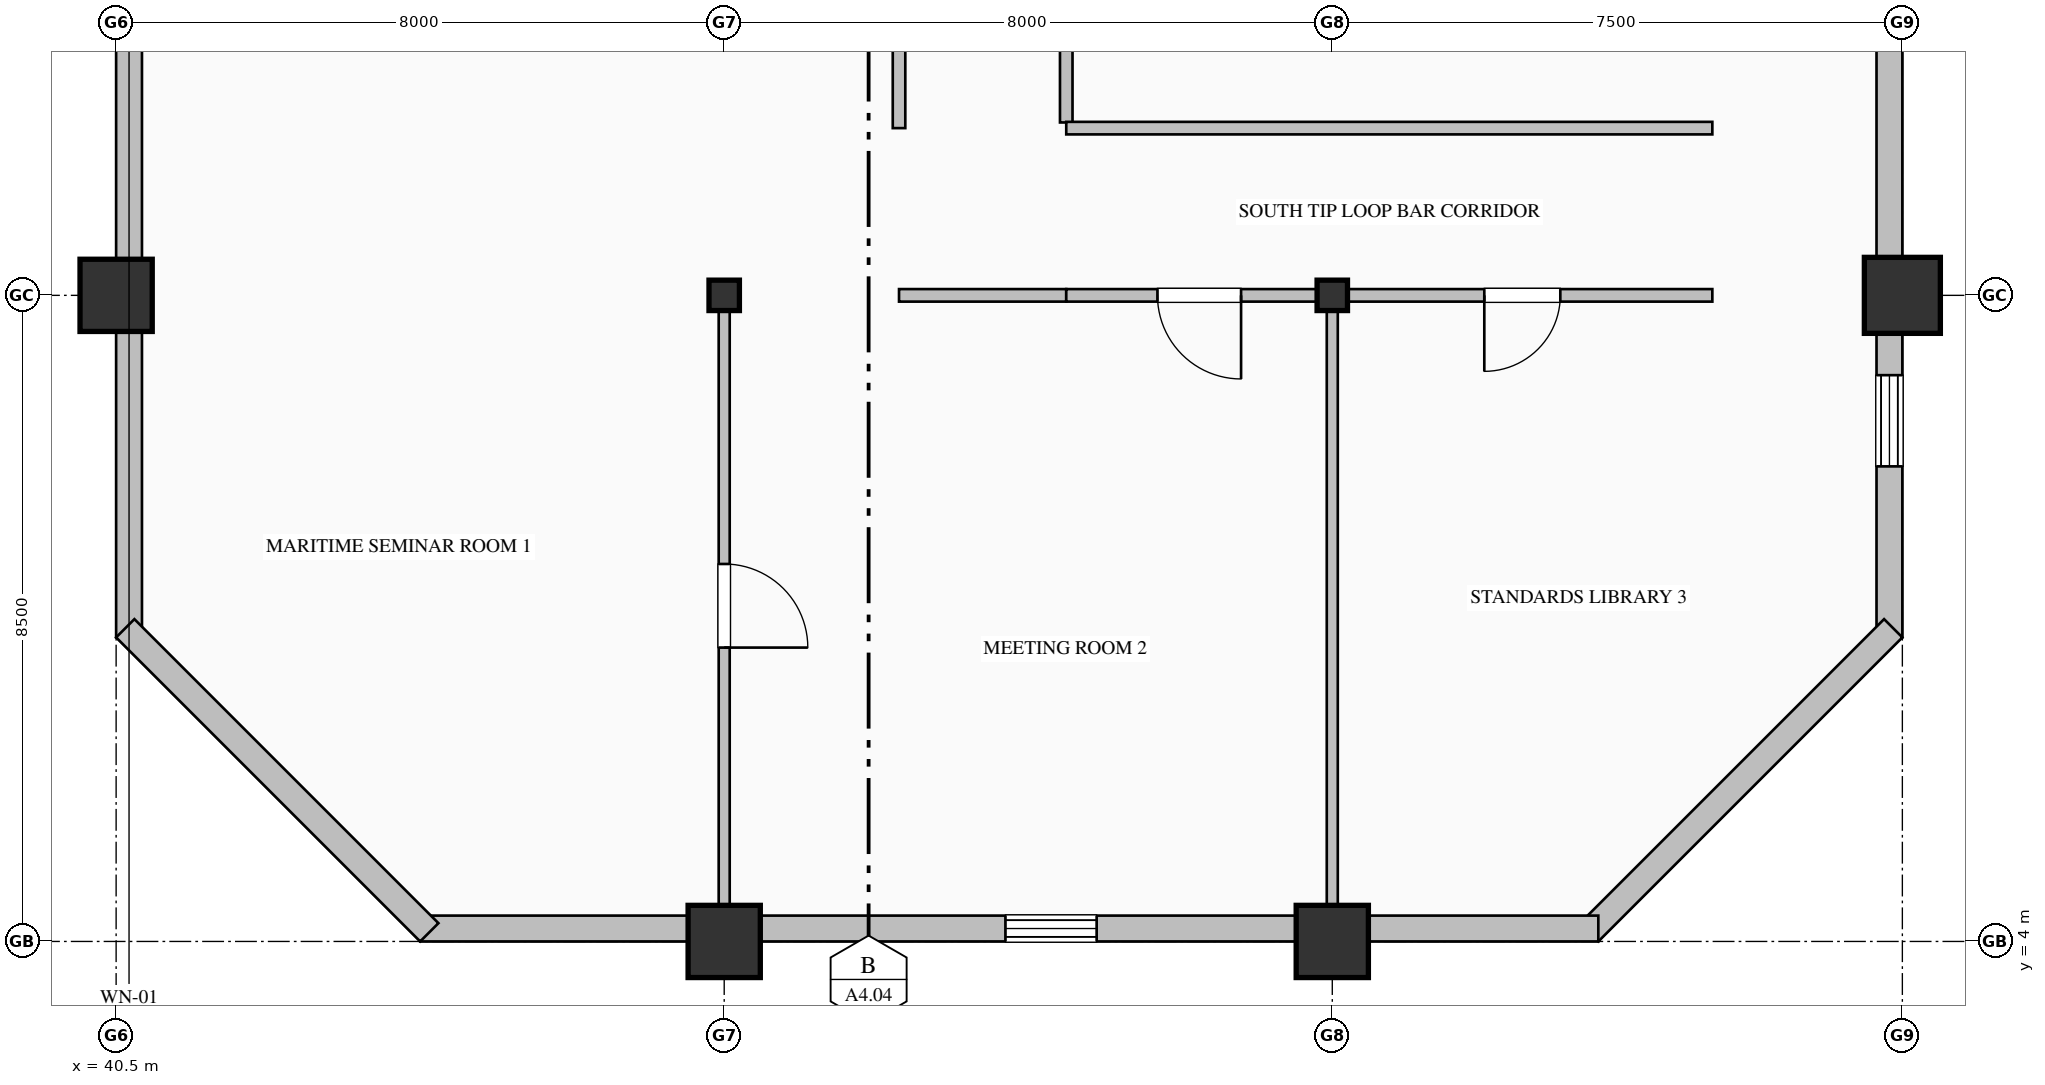
"""IFC4 building model, lengths in metres.
Left out: names, types, materials, properties, quantities, classifications, styles, units other than length and angle.
Written with IfcOpenShell. Run it as: python <this file> out.ifc"""

import sys

from ifc_helpers import new_model, si_unit, direction, frame, frame_2d, origin, origin_2d, place, context, subcontext, project, spatial, rectangle, hollow_rectangle, hollow_circle, i_section, extrude, element, fill, save


model = new_model("IFC4")
c1 = context("Model", 3, precision=1e-05, world=origin(), true_north=direction((0.0, 1.0)))
c2 = subcontext(c1, "Body", "Model", "MODEL_VIEW")
j1 = project(units=[si_unit("LENGTHUNIT", "METRE"), si_unit("PLANEANGLEUNIT", "RADIAN")], contexts=[c1])
p1 = place(None, origin())
s1 = spatial("IfcSite", under=j1, at=p1, CompositionType="ELEMENT")
p2 = place(p1, origin())
s2 = spatial("IfcBuilding", under=s1, at=p2, CompositionType="ELEMENT")
p3 = place(p2, frame((0.0, 0.0, 135.0)))
s3 = spatial("IfcBuildingStorey", under=s2, at=p3, CompositionType="ELEMENT", Elevation=135.0)
for number, where, z_axis, x_axis in (
    (1, (40.5, 12.5, 0.0), (0.0, 0.0, 1.0), (1.0, 0.0, 0.0)),
    (2, (48.5, 4.0, 0.0), (0.0, 0.0, 1.0), (1.0, 0.0, 0.0)),
):
    element("IfcColumn", number, at=place(p3, frame(where, z_axis=z_axis, x_axis=x_axis)), inside=s3, PredefinedType="COLUMN", context=c2, shape_type="SweptSolid", body=[
        extrude(hollow_rectangle(XDim=0.95, YDim=0.95, WallThickness=0.036, at=origin_2d()), origin(), (0.0, 0.0, 1.0), 4.0),
    ])
p4 = place(p3, frame((48.5, 12.5, 0.0), z_axis=(0.0, 0.0, 1.0), x_axis=(1.0, 0.0, 0.0)))
e3 = element("IfcColumn", 3, at=p4, inside=s3, PredefinedType="COLUMN", context=c2, shape_type="SweptSolid", body=[
    extrude(i_section(OverallWidth=0.4, OverallDepth=0.4, WebThickness=0.013, FlangeThickness=0.021, FilletRadius=0.022, at=origin_2d()), origin(), (0.0, 0.0, 1.0), 4.0),
])
p5 = place(p3, frame((56.5, 4.0, 0.0), z_axis=(0.0, 0.0, 1.0), x_axis=(1.0, 0.0, 0.0)))
e4 = element("IfcColumn", 4, at=p5, inside=s3, PredefinedType="COLUMN", context=c2, shape_type="SweptSolid", body=[
    extrude(hollow_rectangle(XDim=0.95, YDim=0.95, WallThickness=0.036, at=origin_2d()), origin(), (0.0, 0.0, 1.0), 4.0),
])
p6 = place(p3, frame((56.5, 12.5, 0.0), z_axis=(0.0, 0.0, 1.0), x_axis=(1.0, 0.0, 0.0)))
e5 = element("IfcColumn", 5, at=p6, inside=s3, PredefinedType="COLUMN", context=c2, shape_type="SweptSolid", body=[
    extrude(i_section(OverallWidth=0.4, OverallDepth=0.4, WebThickness=0.013, FlangeThickness=0.021, FilletRadius=0.022, at=origin_2d()), origin(), (0.0, 0.0, 1.0), 4.0),
])
p7 = place(p3, frame((64.0, 12.5, 0.0), z_axis=(0.0, 0.0, 1.0), x_axis=(1.0, 0.0, 0.0)))
e6 = element("IfcColumn", 6, at=p7, inside=s3, PredefinedType="COLUMN", context=c2, shape_type="SweptSolid", body=[
    extrude(hollow_circle(Radius=0.5, WallThickness=0.036, at=origin_2d()), origin(), (0.0, 0.0, 1.0), 4.0),
])
p8 = place(p3, frame((40.67, 8.0, 0.0), z_axis=(0.0, 0.0, 1.0), x_axis=(0.0, 1.0, 0.0)))
e7 = element("IfcWall", 7, at=p8, inside=s3, PredefinedType="SOLIDWALL", context=c2, shape_type="SweptSolid", body=[
    extrude(rectangle(XDim=20.34, YDim=0.34, at=frame_2d((10.17, 0.0))), origin(), (0.0, 0.0, 1.0), 3.165),
])
p9 = place(p8, frame((13.8, 0.0, 0.7)))
e8 = element("IfcOpeningElement", 8, at=p9, cuts=e7, PredefinedType="OPENING", context=c2, shape_type="SweptSolid", body=[
    extrude(rectangle(XDim=1.2, YDim=1.85, at=frame_2d((0.6, 0.925))), frame((0.0, 0.18, 0.0), z_axis=(0.0, -1.0, 0.0), x_axis=(1.0, 0.0, 0.0)), (0.0, 0.0, 1.0), 0.36),
])
p10 = place(p3, frame((63.83, 36.05, 0.0), z_axis=(0.0, 0.0, 1.0), x_axis=(0.0, -1.0, 0.0)))
e9 = element("IfcWall", 9, at=p10, inside=s3, PredefinedType="SOLIDWALL", context=c2, shape_type="SweptSolid", body=[
    extrude(rectangle(XDim=28.05, YDim=0.34, at=frame_2d((14.025, 0.0))), origin(), (0.0, 0.0, 1.0), 3.265),
])
p11 = place(p10, frame((3.0, 0.0, 0.7)))
e10 = element("IfcOpeningElement", 10, at=p11, cuts=e9, PredefinedType="OPENING", context=c2, shape_type="SweptSolid", body=[
    extrude(rectangle(XDim=1.2, YDim=1.85, at=frame_2d((0.6, 0.925))), frame((0.0, 0.18, 0.0), z_axis=(0.0, -1.0, 0.0), x_axis=(1.0, 0.0, 0.0)), (0.0, 0.0, 1.0), 0.36),
])
p12 = place(p10, frame((9.975, 0.0, 0.85)))
e11 = element("IfcOpeningElement", 11, at=p12, cuts=e9, PredefinedType="OPENING", context=c2, shape_type="SweptSolid", body=[
    extrude(rectangle(XDim=1.65, YDim=1.95, at=frame_2d((0.825, 0.975))), frame((0.0, 0.18, 0.0), z_axis=(0.0, -1.0, 0.0), x_axis=(1.0, 0.0, 0.0)), (0.0, 0.0, 1.0), 0.36),
])
p13 = place(p10, frame((13.8, 0.0, 0.7)))
e12 = element("IfcOpeningElement", 12, at=p13, cuts=e9, PredefinedType="OPENING", context=c2, shape_type="SweptSolid", body=[
    extrude(rectangle(XDim=1.2, YDim=1.85, at=frame_2d((0.6, 0.925))), frame((0.0, 0.18, 0.0), z_axis=(0.0, -1.0, 0.0), x_axis=(1.0, 0.0, 0.0)), (0.0, 0.0, 1.0), 0.36),
])
p14 = place(p10, frame((24.6, 0.0, 0.7)))
e13 = element("IfcOpeningElement", 13, at=p14, cuts=e9, PredefinedType="OPENING", context=c2, shape_type="SweptSolid", body=[
    extrude(rectangle(XDim=1.2, YDim=1.85, at=frame_2d((0.6, 0.925))), frame((0.0, 0.18, 0.0), z_axis=(0.0, -1.0, 0.0), x_axis=(1.0, 0.0, 0.0)), (0.0, 0.0, 1.0), 0.36),
])
p15 = place(p3, frame((63.88, 8.12, 0.0), z_axis=(0.0, 0.0, 1.0), x_axis=(-0.707106781187, -0.707106781187, 0.0)))
e14 = element("IfcWall", 14, at=p15, inside=s3, PredefinedType="SOLIDWALL", context=c2, shape_type="SweptSolid", body=[
    extrude(rectangle(XDim=5.657, YDim=0.34, at=frame_2d((2.828, 0.0))), origin(), (0.0, 0.0, 1.0), 3.765),
])
p16 = place(p3, frame((60.0, 4.17, 0.0), z_axis=(0.0, 0.0, 1.0), x_axis=(-1.0, 0.0, 0.0)))
e15 = element("IfcWall", 15, at=p16, inside=s3, PredefinedType="SOLIDWALL", context=c2, shape_type="SweptSolid", body=[
    extrude(rectangle(XDim=15.5, YDim=0.34, at=frame_2d((7.75, 0.0))), origin(), (0.0, 0.0, 1.0), 3.265),
])
p17 = place(p16, frame((6.6, 0.0, 0.7)))
e16 = element("IfcOpeningElement", 16, at=p17, cuts=e15, PredefinedType="OPENING", context=c2, shape_type="SweptSolid", body=[
    extrude(rectangle(XDim=1.2, YDim=1.85, at=frame_2d((0.6, 0.925))), frame((0.0, 0.18, 0.0), z_axis=(0.0, -1.0, 0.0), x_axis=(1.0, 0.0, 0.0)), (0.0, 0.0, 1.0), 0.36),
])
p18 = place(p3, frame((44.62, 4.12, 0.0), z_axis=(0.0, 0.0, 1.0), x_axis=(-0.707106781187, 0.707106781187, 0.0)))
e17 = element("IfcWall", 17, at=p18, inside=s3, PredefinedType="SOLIDWALL", context=c2, shape_type="SweptSolid", body=[
    extrude(rectangle(XDim=5.657, YDim=0.34, at=frame_2d((2.828, 0.0))), origin(), (0.0, 0.0, 1.0), 3.765),
])
p19 = place(p3, frame((53.0, 33.525, 0.0), z_axis=(0.0, 0.0, 1.0), x_axis=(0.0, -1.0, 0.0)))
e18 = element("IfcWall", 18, at=p19, inside=s3, PredefinedType="PARTITIONING", context=c2, shape_type="SweptSolid", body=[
    extrude(rectangle(XDim=18.751, YDim=0.165, at=frame_2d((9.375, 0.0))), origin(), (0.0, 0.0, 1.0), 3.765),
])
p20 = place(p19, frame((8.875, 0.0, 0.0)))
e19 = element("IfcOpeningElement", 19, at=p20, cuts=e18, PredefinedType="OPENING", context=c2, shape_type="SweptSolid", body=[
    extrude(rectangle(XDim=1.0, YDim=2.15, at=frame_2d((0.5, 1.075))), frame((0.0, 0.093, 0.0), z_axis=(0.0, -1.0, 0.0), x_axis=(1.0, 0.0, 0.0)), (0.0, 0.0, 1.0), 0.185),
])
p21 = place(p3, frame((50.8, 14.7, 0.0), z_axis=(0.0, 0.0, 1.0), x_axis=(0.0, 1.0, 0.0)))
e20 = element("IfcWall", 20, at=p21, inside=s3, PredefinedType="PARTITIONING", context=c2, shape_type="SweptSolid", body=[
    extrude(rectangle(XDim=18.825, YDim=0.165, at=frame_2d((9.413, 0.0))), origin(), (0.0, 0.0, 1.0), 3.765),
])
p22 = place(p21, frame((8.913, 0.0, 0.0)))
e21 = element("IfcOpeningElement", 21, at=p22, cuts=e20, PredefinedType="OPENING", context=c2, shape_type="SweptSolid", body=[
    extrude(rectangle(XDim=1.0, YDim=2.15, at=frame_2d((0.5, 1.075))), frame((0.0, 0.093, 0.0), z_axis=(0.0, -1.0, 0.0), x_axis=(1.0, 0.0, 0.0)), (0.0, 0.0, 1.0), 0.185),
])
p23 = place(p3, frame((53.0, 12.5, 0.0), z_axis=(0.0, 0.0, 1.0), x_axis=(-1.0, 0.0, 0.0)))
e22 = element("IfcWall", 22, at=p23, inside=s3, PredefinedType="PARTITIONING", context=c2, shape_type="SweptSolid", body=[
    extrude(rectangle(XDim=2.2, YDim=0.165, at=frame_2d((1.1, 0.0))), origin(), (0.0, 0.0, 1.0), 3.157),
])
p24 = place(p3, frame((53.0, 14.7, 0.0), z_axis=(0.0, 0.0, 1.0), x_axis=(1.0, 0.0, 0.0)))
e23 = element("IfcWall", 23, at=p24, inside=s3, PredefinedType="PARTITIONING", context=c2, shape_type="SweptSolid", body=[
    extrude(rectangle(XDim=8.5, YDim=0.165, at=frame_2d((4.25, 0.0))), origin(), (0.0, 0.0, 1.0), 3.765),
])
p25 = place(p3, frame((56.5, 12.5, 0.0), z_axis=(0.0, 0.0, 1.0), x_axis=(-1.0, 0.0, 0.0)))
e24 = element("IfcWall", 24, at=p25, inside=s3, PredefinedType="PARTITIONING", context=c2, shape_type="SweptSolid", body=[
    extrude(rectangle(XDim=3.5, YDim=0.165, at=frame_2d((1.75, 0.0))), origin(), (0.0, 0.0, 1.0), 3.157),
])
p26 = place(p25, frame((1.2, 0.0, 0.0)))
e25 = element("IfcOpeningElement", 25, at=p26, cuts=e24, PredefinedType="OPENING", context=c2, shape_type="SweptSolid", body=[
    extrude(rectangle(XDim=1.1, YDim=2.2, at=frame_2d((0.55, 1.1))), frame((0.0, 0.093, 0.0), z_axis=(0.0, -1.0, 0.0), x_axis=(1.0, 0.0, 0.0)), (0.0, 0.0, 1.0), 0.185),
])
p27 = place(p3, frame((61.5, 12.5, 0.0), z_axis=(0.0, 0.0, 1.0), x_axis=(-1.0, 0.0, 0.0)))
e26 = element("IfcWall", 26, at=p27, inside=s3, PredefinedType="PARTITIONING", context=c2, shape_type="SweptSolid", body=[
    extrude(rectangle(XDim=5.0, YDim=0.165, at=frame_2d((2.5, 0.0))), origin(), (0.0, 0.0, 1.0), 3.157),
])
p28 = place(p27, frame((2.0, 0.0, 0.0)))
e27 = element("IfcOpeningElement", 27, at=p28, cuts=e26, PredefinedType="OPENING", context=c2, shape_type="SweptSolid", body=[
    extrude(rectangle(XDim=1.0, YDim=2.15, at=frame_2d((0.5, 1.075))), frame((0.0, 0.093, 0.0), z_axis=(0.0, -1.0, 0.0), x_axis=(1.0, 0.0, 0.0)), (0.0, 0.0, 1.0), 0.185),
])
p29 = place(p3, frame((48.5, 12.5, 0.0), z_axis=(0.0, 0.0, 1.0), x_axis=(0.0, -1.0, 0.0)))
e28 = element("IfcWall", 28, at=p29, inside=s3, PredefinedType="PARTITIONING", context=c2, shape_type="SweptSolid", body=[
    extrude(rectangle(XDim=8.168, YDim=0.145, at=frame_2d((4.084, 0.0))), origin(), (0.0, 0.0, 1.0), 3.157),
])
p30 = place(p29, frame((3.534, 0.0, 0.0)))
e29 = element("IfcOpeningElement", 29, at=p30, cuts=e28, PredefinedType="OPENING", context=c2, shape_type="SweptSolid", body=[
    extrude(rectangle(XDim=1.1, YDim=2.2, at=frame_2d((0.55, 1.1))), frame((0.0, 0.083, 0.0), z_axis=(0.0, -1.0, 0.0), x_axis=(1.0, 0.0, 0.0)), (0.0, 0.0, 1.0), 0.165),
])
p31 = place(p3, frame((56.5, 12.426, 0.0), z_axis=(0.0, 0.0, 1.0), x_axis=(0.0, -1.0, 0.0)))
e30 = element("IfcWall", 30, at=p31, inside=s3, PredefinedType="PARTITIONING", context=c2, shape_type="SweptSolid", body=[
    extrude(rectangle(XDim=8.094, YDim=0.145, at=frame_2d((4.047, 0.0))), origin(), (0.0, 0.0, 1.0), 3.157),
])
p32 = place(p14, origin())
e31 = element("IfcWindow", 31, at=p32, inside=s3, PartitioningType="DOUBLE_PANEL_VERTICAL", PredefinedType="WINDOW", context=c2, shape_type="SweptSolid", body=[
    extrude(rectangle(XDim=1.2, YDim=1.85, at=frame_2d((0.6, 0.925))), frame((0.0, 0.15, 0.0), z_axis=(0.0, -1.0, 0.0), x_axis=(1.0, 0.0, 0.0)), (0.0, 0.0, 1.0), 0.06),
])
fill(e13, e31)
p33 = place(p17, origin())
e32 = element("IfcWindow", 32, at=p33, inside=s3, PartitioningType="DOUBLE_PANEL_VERTICAL", PredefinedType="WINDOW", context=c2, shape_type="SweptSolid", body=[
    extrude(rectangle(XDim=1.2, YDim=1.85, at=frame_2d((0.6, 0.925))), frame((0.0, 0.15, 0.0), z_axis=(0.0, -1.0, 0.0), x_axis=(1.0, 0.0, 0.0)), (0.0, 0.0, 1.0), 0.06),
])
fill(e16, e32)
p34 = place(p30, origin())
e33 = element("IfcDoor", 33, at=p34, inside=s3, OperationType="SINGLE_SWING_RIGHT", PredefinedType="DOOR", context=c2, shape_type="SweptSolid", body=[
    extrude(rectangle(XDim=1.1, YDim=2.2, at=frame_2d((0.55, 1.1))), frame((0.0, 0.025, 0.0), z_axis=(0.0, -1.0, 0.0), x_axis=(1.0, 0.0, 0.0)), (0.0, 0.0, 1.0), 0.05),
])
fill(e29, e33)
p35 = place(p26, origin())
e34 = element("IfcDoor", 34, at=p35, inside=s3, OperationType="SINGLE_SWING_LEFT", PredefinedType="DOOR", context=c2, shape_type="SweptSolid", body=[
    extrude(rectangle(XDim=1.1, YDim=2.2, at=frame_2d((0.55, 1.1))), frame((0.0, 0.025, 0.0), z_axis=(0.0, -1.0, 0.0), x_axis=(1.0, 0.0, 0.0)), (0.0, 0.0, 1.0), 0.05),
])
fill(e25, e34)
p36 = place(p28, origin())
e35 = element("IfcDoor", 35, at=p36, inside=s3, OperationType="SINGLE_SWING_RIGHT", PredefinedType="DOOR", context=c2, shape_type="SweptSolid", body=[
    extrude(rectangle(XDim=1.0, YDim=2.15, at=frame_2d((0.5, 1.075))), frame((0.0, 0.025, 0.0), z_axis=(0.0, -1.0, 0.0), x_axis=(1.0, 0.0, 0.0)), (0.0, 0.0, 1.0), 0.05),
])
fill(e27, e35)
save(model, sys.argv[1])
